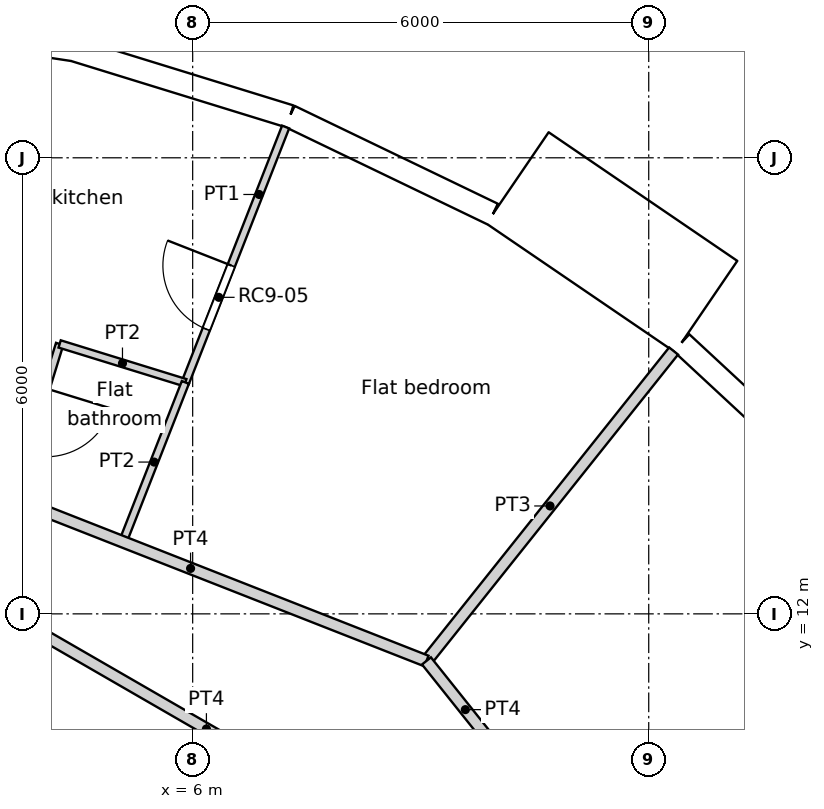
"""IFC4 building model, lengths in metres.
Left out: names, types, materials, properties, quantities, classifications, styles, units other than length and angle.
Written with IfcOpenShell. Run it as: python <this file> out.ifc"""

import sys

from ifc_helpers import new_model, si_unit, direction, frame, frame_2d, origin, origin_2d, place, context, subcontext, project, spatial, rectangle, circle, extrude, element, fill, save


model = new_model("IFC4")
c1 = context("Model", 3, precision=1e-05, world=origin(), true_north=direction((0.0, 1.0)))
c2 = subcontext(c1, "Body", "Model", "MODEL_VIEW")
j1 = project(units=[si_unit("LENGTHUNIT", "METRE"), si_unit("PLANEANGLEUNIT", "RADIAN")], contexts=[c1])
p1 = place(None, origin())
s1 = spatial("IfcSite", under=j1, at=p1, CompositionType="ELEMENT")
p2 = place(p1, origin())
s2 = spatial("IfcBuilding", under=s1, at=p2, CompositionType="ELEMENT")
p3 = place(p2, frame((0.0, 0.0, 316.2)))
s3 = spatial("IfcBuildingStorey", under=s2, at=p3, CompositionType="ELEMENT", Elevation=316.2)
for number, where, z_axis, x_axis in (
    (1, (11.735, 14.716, 0.0), (0.0, 0.0, 1.0), (1.0, 0.0, 0.0)),
    (2, (6.876, 17.521, 0.0), (0.0, 0.0, 1.0), (1.0, 0.0, 0.0)),
):
    element("IfcColumn", number, at=place(p3, frame(where, z_axis=z_axis, x_axis=x_axis)), inside=s3, PredefinedType="COLUMN", context=c2, shape_type="SweptSolid", body=[
        extrude(circle(Radius=0.45, at=origin_2d()), origin(), (0.0, 0.0, 1.0), 3.6),
    ])
p4 = place(p3, frame((14.604, 13.55, 0.0), z_axis=(0.0, 0.0, 1.0), x_axis=(-0.733066412643, 0.680157066165, 0.0)))
e3 = element("IfcWall", 3, at=p4, inside=s3, PredefinedType="SOLIDWALL", context=c2, shape_type="SweptSolid", body=[
    extrude(rectangle(XDim=2.962, YDim=0.3, at=frame_2d((1.481, 0.0))), origin(), (0.0, 0.0, 1.0), 3.25),
])
p5 = place(p4, frame((1.481, 0.0, 1.55)))
e4 = element("IfcOpeningElement", 4, at=p5, cuts=e3, PredefinedType="OPENING", context=c2, shape_type="SweptSolid", body=[
    extrude(circle(Radius=0.9, at=origin_2d()), frame((0.0, 0.16, 0.0), z_axis=(0.0, -1.0, 0.0), x_axis=(1.0, 0.0, 0.0)), (0.0, 0.0, 1.0), 0.32),
])
p6 = place(p3, frame((12.754, 16.044, -0.35), z_axis=(0.0, 0.0, 1.0), x_axis=(-0.826246281157, 0.563309047392, 0.0)))
e5 = element("IfcWall", 5, at=p6, inside=s3, PredefinedType="ELEMENTEDWALL", context=c2, shape_type="SweptSolid", body=[
    extrude(rectangle(XDim=3.0, YDim=1.45, at=frame_2d((1.5, 0.0))), origin(), (0.0, 0.0, 1.0), 3.6),
])
p7 = place(p6, frame((1.5, 0.0, 1.9)))
e6 = element("IfcOpeningElement", 6, at=p7, cuts=e5, PredefinedType="OPENING", context=c2, shape_type="SweptSolid", body=[
    extrude(circle(Radius=0.9, at=origin_2d()), frame((0.0, 0.735, 0.0), z_axis=(0.0, -1.0, 0.0), x_axis=(1.0, 0.0, 0.0)), (0.0, 0.0, 1.0), 1.47),
])
p8 = place(p3, frame((9.947, 17.259, 0.0), z_axis=(0.0, 0.0, 1.0), x_axis=(-0.900939615635, 0.433944476838, 0.0)))
e7 = element("IfcWall", 7, at=p8, inside=s3, PredefinedType="SOLIDWALL", context=c2, shape_type="SweptSolid", body=[
    extrude(rectangle(XDim=2.962, YDim=0.3, at=frame_2d((1.481, 0.0))), origin(), (0.0, 0.0, 1.0), 3.25),
])
p9 = place(p8, frame((1.481, 0.0, 1.55)))
e8 = element("IfcOpeningElement", 8, at=p9, cuts=e7, PredefinedType="OPENING", context=c2, shape_type="SweptSolid", body=[
    extrude(circle(Radius=0.9, at=origin_2d()), frame((0.0, 0.16, 0.0), z_axis=(0.0, -1.0, 0.0), x_axis=(1.0, 0.0, 0.0)), (0.0, 0.0, 1.0), 0.32),
])
p10 = place(p3, frame((7.278, 18.545, 0.0), z_axis=(0.0, 0.0, 1.0), x_axis=(-0.95558635705, 0.294711238707, 0.0)))
e9 = element("IfcWall", 9, at=p10, inside=s3, PredefinedType="SOLIDWALL", context=c2, shape_type="SweptSolid", body=[
    extrude(rectangle(XDim=2.962, YDim=0.3, at=frame_2d((1.481, 0.0))), origin(), (0.0, 0.0, 1.0), 3.25),
])
p11 = place(p10, frame((1.481, 0.0, 1.55)))
e10 = element("IfcOpeningElement", 10, at=p11, cuts=e9, PredefinedType="OPENING", context=c2, shape_type="SweptSolid", body=[
    extrude(circle(Radius=0.9, at=origin_2d()), frame((0.0, 0.16, 0.0), z_axis=(0.0, -1.0, 0.0), x_axis=(1.0, 0.0, 0.0)), (0.0, 0.0, 1.0), 0.32),
])
p12 = place(p3, frame((4.53, 19.989, -0.35), z_axis=(0.0, 0.0, 1.0), x_axis=(-0.988836445254, 0.149004981587, 0.0)))
e11 = element("IfcWall", 11, at=p12, inside=s3, PredefinedType="ELEMENTEDWALL", context=c2, shape_type="SweptSolid", body=[
    extrude(rectangle(XDim=3.0, YDim=1.45, at=frame_2d((1.5, 0.0))), origin(), (0.0, 0.0, 1.0), 3.6),
])
p13 = place(p12, frame((1.5, 0.0, 1.9)))
e12 = element("IfcOpeningElement", 12, at=p13, cuts=e11, PredefinedType="OPENING", context=c2, shape_type="SweptSolid", body=[
    extrude(circle(Radius=0.9, at=origin_2d()), frame((0.0, 0.735, 0.0), z_axis=(0.0, -1.0, 0.0), x_axis=(1.0, 0.0, 0.0)), (0.0, 0.0, 1.0), 1.47),
])
p14 = place(p3, frame((3.261, 12.171, 0.0), z_axis=(0.0, 0.0, 1.0), x_axis=(0.866066809554, -0.499928276245, 0.0)))
e13 = element("IfcWall", 13, at=p14, inside=s3, PredefinedType="PARTITIONING", context=c2, shape_type="SweptSolid", body=[
    extrude(rectangle(XDim=6.743, YDim=0.15, at=frame_2d((3.371, 0.0))), origin(), (0.0, 0.0, 1.0), 3.25),
])
p15 = place(p3, frame((9.076, 11.381, 0.0), z_axis=(0.0, 0.0, 1.0), x_axis=(0.623805208652, -0.781579849829, 0.0)))
e14 = element("IfcWall", 14, at=p15, inside=s3, PredefinedType="PARTITIONING", context=c2, shape_type="SweptSolid", body=[
    extrude(rectangle(XDim=1.64, YDim=0.15, at=frame_2d((0.82, 0.0))), origin(), (0.0, 0.0, 1.0), 3.25),
])
p16 = place(p3, frame((1.088, 14.516, 0.0), z_axis=(0.0, 0.0, 1.0), x_axis=(0.930800934608, -0.365526497168, 0.0)))
e15 = element("IfcWall", 15, at=p16, inside=s3, PredefinedType="PARTITIONING", context=c2, shape_type="SweptSolid", body=[
    extrude(rectangle(XDim=8.581, YDim=0.15, at=frame_2d((4.291, 0.0))), origin(), (0.0, 0.0, 1.0), 3.25),
])
p17 = place(p16, frame((0.864, 0.0, 0.0)))
e16 = element("IfcOpeningElement", 16, at=p17, cuts=e15, PredefinedType="OPENING", context=c2, shape_type="SweptSolid", body=[
    extrude(rectangle(XDim=1.0, YDim=2.1, at=frame_2d((0.5, 1.05))), frame((0.0, 0.075, 0.0), z_axis=(0.0, -1.0, 0.0), x_axis=(1.0, 0.0, 0.0)), (0.0, 0.0, 1.0), 0.15),
])
p18 = place(p3, frame((9.076, 11.381, 0.0), z_axis=(0.0, 0.0, 1.0), x_axis=(0.623460949534, 0.781854490558, 0.0)))
e17 = element("IfcWall", 17, at=p18, inside=s3, PredefinedType="PARTITIONING", context=c2, shape_type="SweptSolid", body=[
    extrude(rectangle(XDim=5.214, YDim=0.15, at=frame_2d((2.607, 0.0))), origin(), (0.0, 0.0, 1.0), 3.25),
])
p19 = place(p3, frame((5.903, 15.041, 0.0), z_axis=(0.0, 0.0, 1.0), x_axis=(0.36523219083, 0.930916455318, 0.0)))
e18 = element("IfcWall", 18, at=p19, inside=s3, PredefinedType="PARTITIONING", context=c2, shape_type="SweptSolid", body=[
    extrude(rectangle(XDim=3.614, YDim=0.1, at=frame_2d((1.807, 0.0))), origin(), (0.0, 0.0, 1.0), 3.25),
])
p20 = place(p19, frame((0.757, 0.0, 0.0)))
e19 = element("IfcOpeningElement", 19, at=p20, cuts=e18, PredefinedType="OPENING", context=c2, shape_type="SweptSolid", body=[
    extrude(rectangle(XDim=0.9, YDim=2.1, at=frame_2d((0.45, 1.05))), frame((0.0, 0.05, 0.0), z_axis=(0.0, -1.0, 0.0), x_axis=(1.0, 0.0, 0.0)), (0.0, 0.0, 1.0), 0.1),
])
p21 = place(p3, frame((4.25, 15.551, 0.0), z_axis=(0.0, 0.0, 1.0), x_axis=(0.955555986234, -0.294809696536, 0.0)))
e20 = element("IfcWall", 20, at=p21, inside=s3, PredefinedType="PARTITIONING", context=c2, shape_type="SweptSolid", body=[
    extrude(rectangle(XDim=1.73, YDim=0.1, at=frame_2d((0.865, 0.0))), origin(), (0.0, 0.0, 1.0), 3.25),
])
p22 = place(p3, frame((3.624, 13.521, 0.0), z_axis=(0.0, 0.0, 1.0), x_axis=(0.294667251911, 0.955599921856, 0.0)))
e21 = element("IfcWall", 21, at=p22, inside=s3, PredefinedType="PARTITIONING", context=c2, shape_type="SweptSolid", body=[
    extrude(rectangle(XDim=2.124, YDim=0.1, at=frame_2d((1.062, 0.0))), origin(), (0.0, 0.0, 1.0), 3.25),
])
p23 = place(p22, frame((0.612, 0.0, 0.0)))
e22 = element("IfcOpeningElement", 22, at=p23, cuts=e21, PredefinedType="OPENING", context=c2, shape_type="SweptSolid", body=[
    extrude(rectangle(XDim=0.9, YDim=2.0, at=frame_2d((0.45, 1.0))), frame((0.0, 0.05, 0.0), z_axis=(0.0, -1.0, 0.0), x_axis=(1.0, 0.0, 0.0)), (0.0, 0.0, 1.0), 0.1),
])
p24 = place(p3, frame((5.082, 12.949, 0.0), z_axis=(0.0, 0.0, 1.0), x_axis=(0.365118857447, 0.930960912142, 0.0)))
e23 = element("IfcWall", 23, at=p24, inside=s3, PredefinedType="PARTITIONING", context=c2, shape_type="SweptSolid", body=[
    extrude(rectangle(XDim=2.251, YDim=0.1, at=frame_2d((1.126, 0.0))), origin(), (0.0, 0.0, 1.0), 3.25),
])
p25 = place(p5, origin())
e24 = element("IfcWindow", 24, at=p25, inside=s3, PartitioningType="SINGLE_PANEL", PredefinedType="WINDOW", context=c2, shape_type="SweptSolid", body=[
    extrude(circle(Radius=0.9, at=origin_2d()), frame((0.0, 0.12, 0.0), z_axis=(0.0, -1.0, 0.0), x_axis=(1.0, 0.0, 0.0)), (0.0, 0.0, 1.0), 0.1),
])
fill(e4, e24)
p26 = place(p7, origin())
e25 = element("IfcWindow", 25, at=p26, inside=s3, PartitioningType="SINGLE_PANEL", PredefinedType="WINDOW", context=c2, shape_type="SweptSolid", body=[
    extrude(circle(Radius=0.9, at=origin_2d()), frame((0.0, 0.695, 0.0), z_axis=(0.0, -1.0, 0.0), x_axis=(1.0, 0.0, 0.0)), (0.0, 0.0, 1.0), 0.1),
])
fill(e6, e25)
p27 = place(p9, origin())
e26 = element("IfcWindow", 26, at=p27, inside=s3, PartitioningType="SINGLE_PANEL", PredefinedType="WINDOW", context=c2, shape_type="SweptSolid", body=[
    extrude(circle(Radius=0.9, at=origin_2d()), frame((0.0, 0.12, 0.0), z_axis=(0.0, -1.0, 0.0), x_axis=(1.0, 0.0, 0.0)), (0.0, 0.0, 1.0), 0.1),
])
fill(e8, e26)
p28 = place(p11, origin())
e27 = element("IfcWindow", 27, at=p28, inside=s3, PartitioningType="SINGLE_PANEL", PredefinedType="WINDOW", context=c2, shape_type="SweptSolid", body=[
    extrude(circle(Radius=0.9, at=origin_2d()), frame((0.0, 0.12, 0.0), z_axis=(0.0, -1.0, 0.0), x_axis=(1.0, 0.0, 0.0)), (0.0, 0.0, 1.0), 0.1),
])
fill(e10, e27)
p29 = place(p20, origin())
e28 = element("IfcDoor", 28, at=p29, inside=s3, OperationType="SINGLE_SWING_RIGHT", PredefinedType="DOOR", context=c2, shape_type="SweptSolid", body=[
    extrude(rectangle(XDim=0.9, YDim=2.1, at=frame_2d((0.45, 1.05))), frame((0.0, 0.025, 0.0), z_axis=(0.0, -1.0, 0.0), x_axis=(1.0, 0.0, 0.0)), (0.0, 0.0, 1.0), 0.05),
])
fill(e19, e28)
save(model, sys.argv[1])
